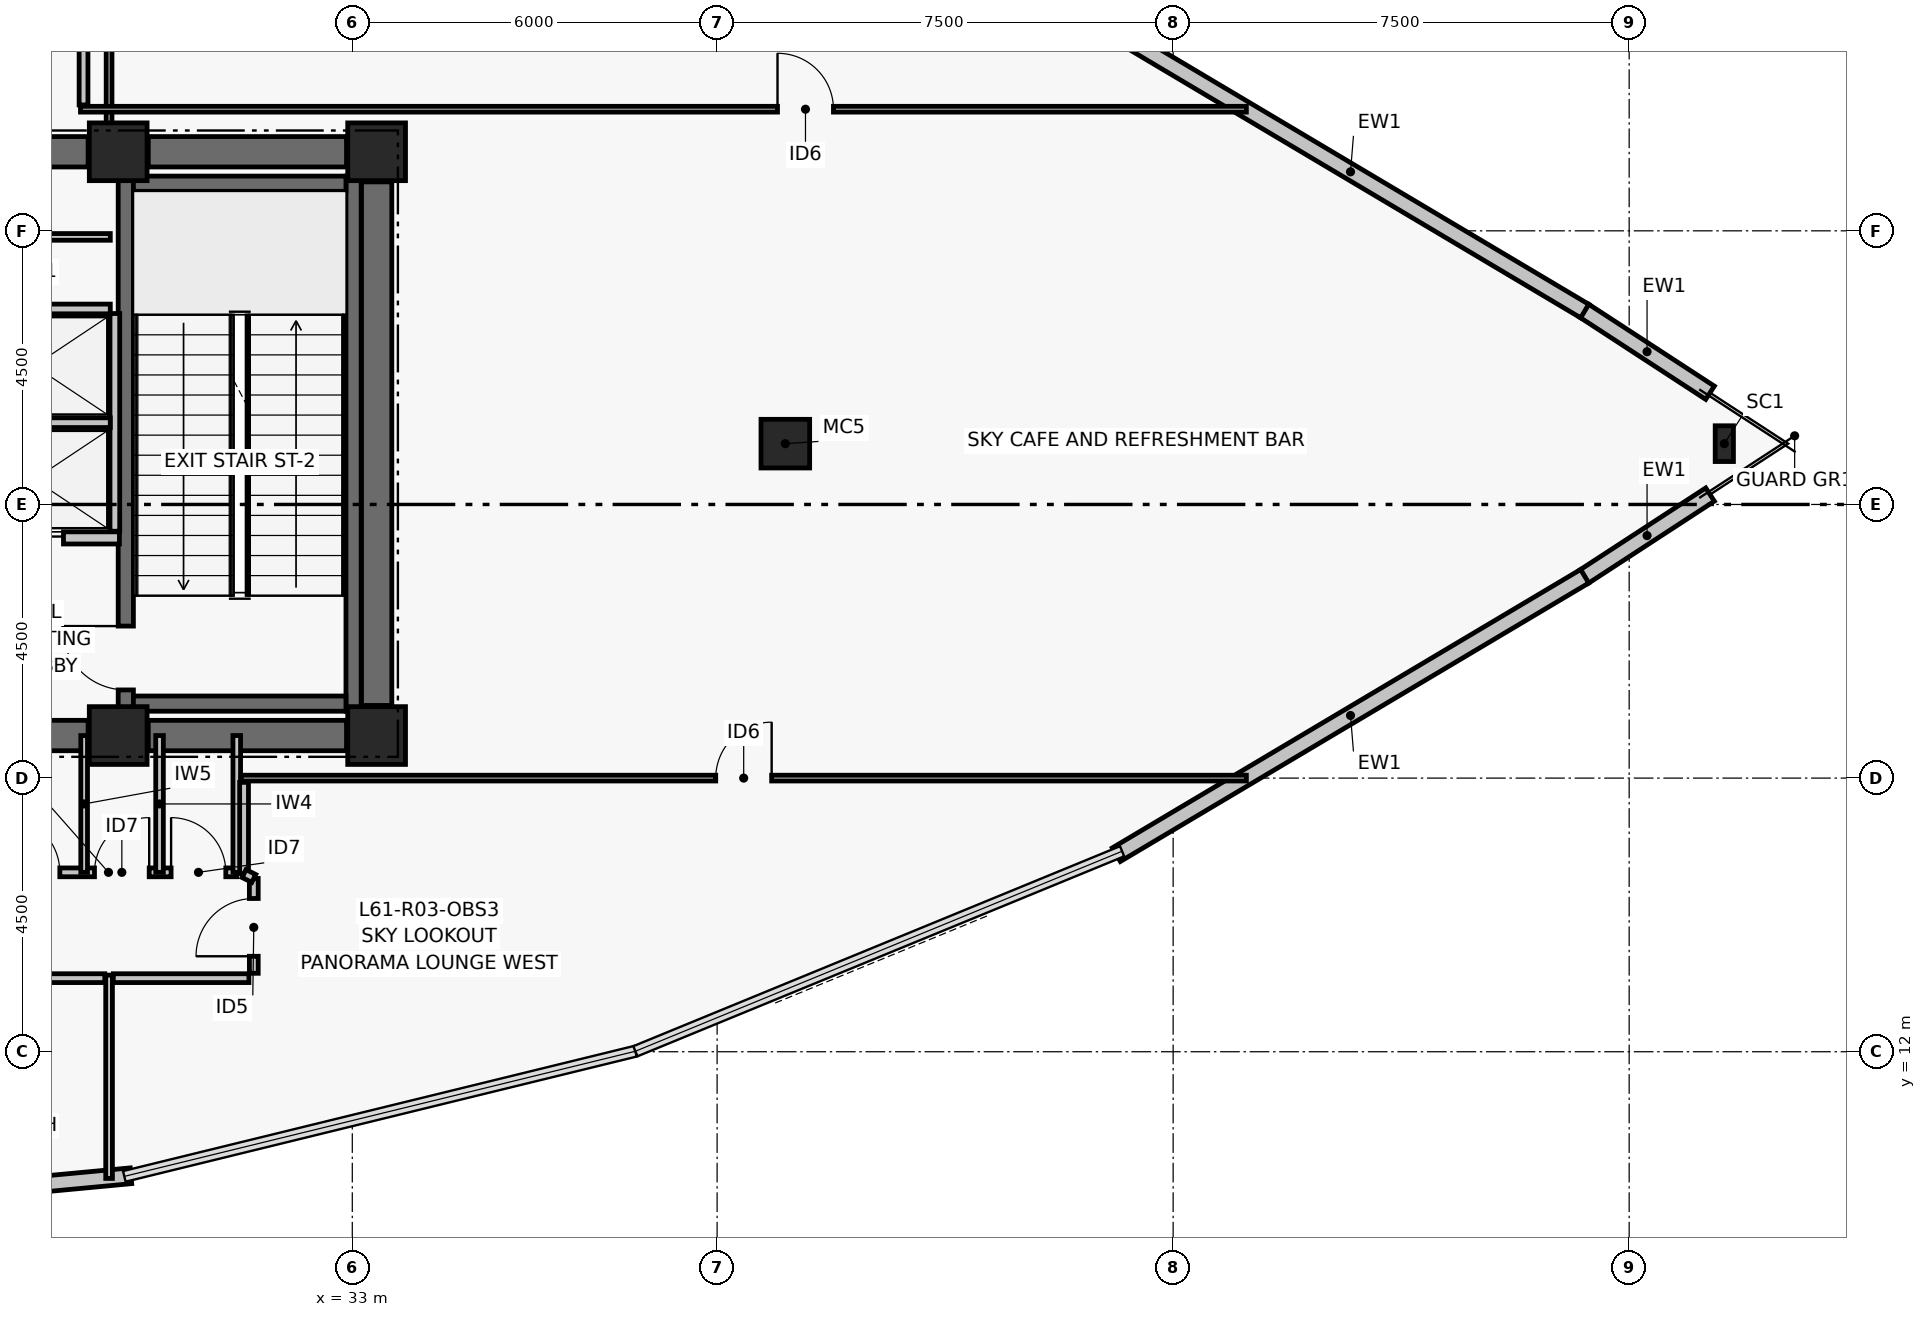
"""IFC4 building model, lengths in metres.
Left out: names, types, materials, properties, quantities, classifications, styles, units other than length and angle.
Written with IfcOpenShell. Run it as: python <this file> out.ifc"""

import sys

from ifc_helpers import new_model, si_unit, direction, frame, frame_2d, origin, origin_2d, place, context, subcontext, project, spatial, rectangle, hollow_rectangle, i_section, extrude, element, fill, save


model = new_model("IFC4")
c1 = context("Model", 3, precision=1e-05, world=origin(), true_north=direction((0.0, 1.0)))
c2 = subcontext(c1, "Body", "Model", "MODEL_VIEW")
j1 = project(units=[si_unit("LENGTHUNIT", "METRE"), si_unit("PLANEANGLEUNIT", "RADIAN")], contexts=[c1])
p1 = place(None, origin())
s1 = spatial("IfcSite", under=j1, at=p1, CompositionType="ELEMENT")
p2 = place(p1, origin())
s2 = spatial("IfcBuilding", under=s1, at=p2, CompositionType="ELEMENT")
p3 = place(p2, frame((0.0, 0.0, 242.64)))
s3 = spatial("IfcBuildingStorey", under=s2, at=p3, CompositionType="ELEMENT", Elevation=242.64)
for number, where, z_axis, x_axis in (
    (1, (29.15, 17.2, 0.0), (0.0, 0.0, 1.0), (1.0, 0.0, 0.0)),
    (2, (33.4, 17.2, 0.0), (0.0, 0.0, 1.0), (1.0, 0.0, 0.0)),
    (3, (29.15, 26.8, 0.0), (0.0, 0.0, 1.0), (1.0, 0.0, 0.0)),
    (4, (33.4, 26.8, 0.0), (0.0, 0.0, 1.0), (1.0, 0.0, 0.0)),
):
    element("IfcColumn", number, at=place(p3, frame(where, z_axis=z_axis, x_axis=x_axis)), inside=s3, PredefinedType="COLUMN", context=c2, shape_type="SweptSolid", body=[
        extrude(rectangle(XDim=0.95, YDim=0.95, at=origin_2d()), origin(), (0.0, 0.0, 1.0), 4.5),
    ])
p4 = place(p3, frame((26.85, 17.2, 0.0), z_axis=(0.0, 0.0, 1.0), x_axis=(1.0, 0.0, 0.0)))
e5 = element("IfcWall", 5, at=p4, inside=s3, PredefinedType="SHEAR", context=c2, shape_type="SweptSolid", body=[
    extrude(rectangle(XDim=1.805, YDim=0.5, at=frame_2d((0.902, 0.0))), origin(), (0.0, 0.0, 1.0), 4.28),
])
p5 = place(p3, frame((29.645, 17.2, 0.0), z_axis=(0.0, 0.0, 1.0), x_axis=(1.0, 0.0, 0.0)))
e6 = element("IfcWall", 6, at=p5, inside=s3, PredefinedType="SHEAR", context=c2, shape_type="SweptSolid", body=[
    extrude(rectangle(XDim=3.26, YDim=0.5, at=frame_2d((1.63, 0.0))), origin(), (0.0, 0.0, 1.0), 4.28),
])
p6 = place(p3, frame((26.85, 26.8, 0.0), z_axis=(0.0, 0.0, 1.0), x_axis=(1.0, 0.0, 0.0)))
e7 = element("IfcWall", 7, at=p6, inside=s3, PredefinedType="SHEAR", context=c2, shape_type="SweptSolid", body=[
    extrude(rectangle(XDim=1.805, YDim=0.5, at=frame_2d((0.902, 0.0))), origin(), (0.0, 0.0, 1.0), 4.28),
])
p7 = place(p3, frame((29.645, 26.8, 0.0), z_axis=(0.0, 0.0, 1.0), x_axis=(1.0, 0.0, 0.0)))
e8 = element("IfcWall", 8, at=p7, inside=s3, PredefinedType="SHEAR", context=c2, shape_type="SweptSolid", body=[
    extrude(rectangle(XDim=3.26, YDim=0.5, at=frame_2d((1.63, 0.0))), origin(), (0.0, 0.0, 1.0), 4.28),
])
p8 = place(p3, frame((33.4, 17.695, 0.0), z_axis=(0.0, 0.0, 1.0), x_axis=(0.0, 1.0, 0.0)))
e9 = element("IfcWall", 9, at=p8, inside=s3, PredefinedType="SHEAR", context=c2, shape_type="SweptSolid", body=[
    extrude(rectangle(XDim=8.61, YDim=0.5, at=frame_2d((4.305, 0.0))), origin(), (0.0, 0.0, 1.0), 4.28),
])
p9 = place(p3, frame((29.275, 17.6, 0.0), z_axis=(0.0, 0.0, 1.0), x_axis=(0.0, 1.0, 0.0)))
e10 = element("IfcWall", 10, at=p9, inside=s3, PredefinedType="SHEAR", context=c2, shape_type="SweptSolid", body=[
    extrude(rectangle(XDim=8.8, YDim=0.25, at=frame_2d((4.4, 0.0))), origin(), (0.0, 0.0, 1.0), 4.28),
])
p10 = place(p9, frame((0.35, 0.0, 0.0)))
e11 = element("IfcOpeningElement", 11, at=p10, cuts=e10, PredefinedType="OPENING", context=c2, shape_type="SweptSolid", body=[
    extrude(rectangle(XDim=1.05, YDim=2.08, at=frame_2d((0.525, 1.04))), frame((0.0, 0.135, 0.0), z_axis=(0.0, -1.0, 0.0), x_axis=(1.0, 0.0, 0.0)), (0.0, 0.0, 1.0), 0.27),
])
p11 = place(p3, frame((33.021, 17.6, 0.0), z_axis=(0.0, 0.0, 1.0), x_axis=(0.0, 1.0, 0.0)))
e12 = element("IfcWall", 12, at=p11, inside=s3, PredefinedType="SHEAR", context=c2, shape_type="SweptSolid", body=[
    extrude(rectangle(XDim=8.8, YDim=0.25, at=frame_2d((4.4, 0.0))), origin(), (0.0, 0.0, 1.0), 4.28),
])
for number, where, z_axis, x_axis in (
    (13, (29.4, 17.725, 0.0), (0.0, 0.0, 1.0), (1.0, 0.0, 0.0)),
    (14, (29.4, 26.275, 0.0), (0.0, 0.0, 1.0), (1.0, 0.0, 0.0)),
):
    element("IfcWall", number, at=place(p3, frame(where, z_axis=z_axis, x_axis=x_axis)), inside=s3, PredefinedType="SHEAR", context=c2, shape_type="SweptSolid", body=[
        extrude(rectangle(XDim=3.496, YDim=0.25, at=frame_2d((1.748, 0.0))), origin(), (0.0, 0.0, 1.0), 4.28),
    ])
p12 = place(p3, frame((40.122, 22.0, 0.0), z_axis=(0.0, 0.0, 1.0), x_axis=(1.0, 0.0, 0.0)))
e15 = element("IfcColumn", 15, at=p12, inside=s3, PredefinedType="COLUMN", context=c2, shape_type="SweptSolid", body=[
    extrude(hollow_rectangle(XDim=0.8, YDim=0.8, WallThickness=0.035, at=origin_2d()), origin(), (0.0, 0.0, 1.0), 4.5),
])
p13 = place(p3, frame((55.565, 22.0, 0.0), z_axis=(0.0, 0.0, 1.0), x_axis=(1.0, 0.0, 0.0)))
e16 = element("IfcColumn", 16, at=p13, inside=s3, PredefinedType="COLUMN", context=c2, shape_type="SweptSolid", body=[
    extrude(i_section(OverallWidth=0.3, OverallDepth=0.588, WebThickness=0.012, FlangeThickness=0.02, at=origin_2d()), origin(), (0.0, 0.0, 1.0), 4.5),
])
for number, where, z_axis, x_axis in (
    (17, (55.33, 21.163, 0.0), (0.0, 0.0, 1.0), (-0.838, -0.546, 0.0)),
    (18, (53.259, 24.187, 0.0), (0.0, 0.0, 1.0), (0.838, -0.546, 0.0)),
):
    element("IfcWall", number, at=place(p3, frame(where, z_axis=z_axis, x_axis=x_axis)), inside=s3, PredefinedType="PARTITIONING", context=c2, shape_type="SweptSolid", body=[
        extrude(rectangle(XDim=2.472, YDim=0.26, at=frame_2d((1.236, 0.0))), origin(), (0.0, 0.0, 1.0), 4.28),
    ])
p14 = place(p3, frame((45.566, 28.76, 0.0), z_axis=(0.0, 0.0, 1.0), x_axis=(0.859615449495, -0.510941561227, 0.0)))
e19 = element("IfcWall", 19, at=p14, inside=s3, PredefinedType="PARTITIONING", context=c2, shape_type="SweptSolid", body=[
    extrude(rectangle(XDim=8.961, YDim=0.26, at=frame_2d((4.48, 0.0))), origin(), (0.0, 0.0, 1.0), 4.28),
])
p15 = place(p3, frame((29.36, 9.96, 0.0), z_axis=(0.0, 0.0, 1.0), x_axis=(-0.995616246459, -0.093532292754, 0.0)))
e20 = element("IfcWall", 20, at=p15, inside=s3, PredefinedType="PARTITIONING", context=c2, shape_type="SweptSolid", body=[
    extrude(rectangle(XDim=8.961, YDim=0.26, at=frame_2d((4.48, 0.0))), origin(), (0.0, 0.0, 1.0), 4.28),
])
p16 = place(p3, frame((53.269, 19.819, 0.0), z_axis=(0.0, 0.0, 1.0), x_axis=(-0.859615449495, -0.510941561227, 0.0)))
e21 = element("IfcWall", 21, at=p16, inside=s3, PredefinedType="PARTITIONING", context=c2, shape_type="SweptSolid", body=[
    extrude(rectangle(XDim=8.961, YDim=0.26, at=frame_2d((4.48, 0.0))), origin(), (0.0, 0.0, 1.0), 4.28),
])
p17 = place(p3, frame((26.37, 20.45, 0.0), z_axis=(0.0, 0.0, 1.0), x_axis=(1.0, 0.0, 0.0)))
e22 = element("IfcWall", 22, at=p17, inside=s3, PredefinedType="PARTITIONING", context=c2, shape_type="SweptSolid", body=[
    extrude(rectangle(XDim=2.8, YDim=0.2, at=frame_2d((1.4, 0.0))), origin(), (0.0, 0.0, 1.0), 4.28),
])
p18 = place(p17, frame((0.78, 0.0, 0.0)))
e23 = element("IfcOpeningElement", 23, at=p18, cuts=e22, PredefinedType="OPENING", context=c2, shape_type="SweptSolid", body=[
    extrude(rectangle(XDim=1.1, YDim=2.08, at=frame_2d((0.55, 1.04))), frame((0.0, 0.11, 0.0), z_axis=(0.0, -1.0, 0.0), x_axis=(1.0, 0.0, 0.0)), (0.0, 0.0, 1.0), 0.22),
])
p19 = place(p3, frame((29.095, 20.56, 0.0), z_axis=(0.0, 0.0, 1.0), x_axis=(0.0, 1.0, 0.0)))
e24 = element("IfcWall", 24, at=p19, inside=s3, PredefinedType="PARTITIONING", context=c2, shape_type="SweptSolid", body=[
    extrude(rectangle(XDim=3.58, YDim=0.16, at=frame_2d((1.79, 0.0))), origin(), (0.0, 0.0, 1.0), 4.28),
])
p20 = place(p3, frame((26.37, 22.345, 0.0), z_axis=(0.0, 0.0, 1.0), x_axis=(1.0, 0.0, 0.0)))
e25 = element("IfcWall", 25, at=p20, inside=s3, PredefinedType="PARTITIONING", context=c2, shape_type="SweptSolid", body=[
    extrude(rectangle(XDim=2.65, YDim=0.16, at=frame_2d((1.325, 0.0))), origin(), (0.0, 0.0, 1.0), 4.28),
])
p21 = place(p3, frame((26.53, 24.215, 0.0), z_axis=(0.0, 0.0, 1.0), x_axis=(1.0, 0.0, 0.0)))
e26 = element("IfcWall", 26, at=p21, inside=s3, PredefinedType="PARTITIONING", context=c2, shape_type="SweptSolid", body=[
    extrude(rectangle(XDim=2.49, YDim=0.16, at=frame_2d((1.245, 0.0))), origin(), (0.0, 0.0, 1.0), 4.28),
])
p22 = place(p3, frame((24.26, 25.4, 0.0), z_axis=(0.0, 0.0, 1.0), x_axis=(1.0, 0.0, 0.0)))
e27 = element("IfcWall", 27, at=p22, inside=s3, PredefinedType="PARTITIONING", context=c2, shape_type="SweptSolid", body=[
    extrude(rectangle(XDim=4.76, YDim=0.11, at=frame_2d((2.38, 0.0))), origin(), (0.0, 0.0, 1.0), 4.28),
])
p23 = place(p3, frame((26.88, 14.95, 0.0), z_axis=(0.0, 0.0, 1.0), x_axis=(1.0, 0.0, 0.0)))
e28 = element("IfcWall", 28, at=p23, inside=s3, PredefinedType="PARTITIONING", context=c2, shape_type="SweptSolid", body=[
    extrude(rectangle(XDim=4.22, YDim=0.145, at=frame_2d((2.11, 0.0))), origin(), (0.0, 0.0, 1.0), 3.76),
])
p24 = place(p23, frame((0.39, 0.0, 0.0)))
e29 = element("IfcOpeningElement", 29, at=p24, cuts=e28, PredefinedType="OPENING", context=c2, shape_type="SweptSolid", body=[
    extrude(rectangle(XDim=0.92, YDim=2.05, at=frame_2d((0.46, 1.025))), frame((0.0, 0.083, 0.0), z_axis=(0.0, -1.0, 0.0), x_axis=(1.0, 0.0, 0.0)), (0.0, 0.0, 1.0), 0.165),
])
p25 = place(p23, frame((1.88, 0.0, 0.0)))
e30 = element("IfcOpeningElement", 30, at=p25, cuts=e28, PredefinedType="OPENING", context=c2, shape_type="SweptSolid", body=[
    extrude(rectangle(XDim=0.9, YDim=2.02, at=frame_2d((0.45, 1.01))), frame((0.0, 0.083, 0.0), z_axis=(0.0, -1.0, 0.0), x_axis=(1.0, 0.0, 0.0)), (0.0, 0.0, 1.0), 0.165),
])
p26 = place(p23, frame((3.14, 0.0, 0.0)))
e31 = element("IfcOpeningElement", 31, at=p26, cuts=e28, PredefinedType="OPENING", context=c2, shape_type="SweptSolid", body=[
    extrude(rectangle(XDim=0.9, YDim=2.02, at=frame_2d((0.45, 1.01))), frame((0.0, 0.083, 0.0), z_axis=(0.0, -1.0, 0.0), x_axis=(1.0, 0.0, 0.0)), (0.0, 0.0, 1.0), 0.165),
])
p27 = place(p3, frame((28.59, 14.95, 0.0), z_axis=(0.0, 0.0, 1.0), x_axis=(0.0, 1.0, 0.0)))
e32 = element("IfcWall", 32, at=p27, inside=s3, PredefinedType="PARTITIONING", context=c2, shape_type="SweptSolid", body=[
    extrude(rectangle(XDim=2.25, YDim=0.11, at=frame_2d((1.125, 0.0))), origin(), (0.0, 0.0, 1.0), 3.41),
])
for number, where, z_axis, x_axis in (
    (33, (29.83, 14.95, 0.0), (0.0, 0.0, 1.0), (0.0, 1.0, 0.0)),
    (34, (31.1, 14.95, 0.0), (0.0, 0.0, 1.0), (0.0, 1.0, 0.0)),
):
    element("IfcWall", number, at=place(p3, frame(where, z_axis=z_axis, x_axis=x_axis)), inside=s3, PredefinedType="PARTITIONING", context=c2, shape_type="SweptSolid", body=[
        extrude(rectangle(XDim=2.25, YDim=0.125, at=frame_2d((1.125, 0.0))), origin(), (0.0, 0.0, 1.0), 3.41),
    ])
p28 = place(p3, frame((17.54, 13.21, 0.0), z_axis=(0.0, 0.0, 1.0), x_axis=(1.0, 0.0, 0.0)))
e35 = element("IfcWall", 35, at=p28, inside=s3, PredefinedType="PARTITIONING", context=c2, shape_type="SweptSolid", body=[
    extrude(rectangle(XDim=11.39, YDim=0.145, at=frame_2d((5.695, 0.0))), origin(), (0.0, 0.0, 1.0), 3.56),
])
p29 = place(p28, frame((1.519, 0.0, 0.0)))
e36 = element("IfcOpeningElement", 36, at=p29, cuts=e35, PredefinedType="OPENING", context=c2, shape_type="SweptSolid", body=[
    extrude(rectangle(XDim=0.92, YDim=2.05, at=frame_2d((0.46, 1.025))), frame((0.0, 0.083, 0.0), z_axis=(0.0, -1.0, 0.0), x_axis=(1.0, 0.0, 0.0)), (0.0, 0.0, 1.0), 0.165),
])
p30 = place(p3, frame((29.07, 13.21, 0.0), z_axis=(0.0, 0.0, 1.0), x_axis=(1.0, 0.0, 0.0)))
e37 = element("IfcWall", 37, at=p30, inside=s3, PredefinedType="PARTITIONING", context=c2, shape_type="SweptSolid", body=[
    extrude(rectangle(XDim=2.23, YDim=0.145, at=frame_2d((1.115, 0.0))), origin(), (0.0, 0.0, 1.0), 4.28),
])
p31 = place(p3, frame((31.38, 13.29, 0.0), z_axis=(0.0, 0.0, 1.0), x_axis=(0.0, 1.0, 0.0)))
e38 = element("IfcWall", 38, at=p31, inside=s3, PredefinedType="PARTITIONING", context=c2, shape_type="SweptSolid", body=[
    extrude(rectangle(XDim=1.56, YDim=0.145, at=frame_2d((0.78, 0.0))), origin(), (0.0, 0.0, 1.0), 4.28),
])
p32 = place(p31, frame((0.28, 0.0, 0.0)))
e39 = element("IfcOpeningElement", 39, at=p32, cuts=e38, PredefinedType="OPENING", context=c2, shape_type="SweptSolid", body=[
    extrude(rectangle(XDim=0.95, YDim=2.06, at=frame_2d((0.475, 1.03))), frame((0.0, 0.083, 0.0), z_axis=(0.0, -1.0, 0.0), x_axis=(1.0, 0.0, 0.0)), (0.0, 0.0, 1.0), 0.165),
])
p33 = place(p3, frame((31.22, 14.93, 0.0), z_axis=(0.0, 0.0, 1.0), x_axis=(0.0, 1.0, 0.0)))
e40 = element("IfcWall", 40, at=p33, inside=s3, PredefinedType="PARTITIONING", context=c2, shape_type="SweptSolid", body=[
    extrude(rectangle(XDim=1.5, YDim=0.145, at=frame_2d((0.75, 0.0))), origin(), (0.0, 0.0, 1.0), 3.76),
])
p34 = place(p3, frame((28.58, 27.57, 0.0), z_axis=(0.0, 0.0, 1.0), x_axis=(0.0, 1.0, 0.0)))
e41 = element("IfcWall", 41, at=p34, inside=s3, PredefinedType="PARTITIONING", context=c2, shape_type="SweptSolid", body=[
    extrude(rectangle(XDim=1.13, YDim=0.145, at=frame_2d((0.565, 0.0))), origin(), (0.0, 0.0, 1.0), 4.28),
])
p35 = place(p3, frame((29.0, 9.917, 0.0), z_axis=(0.0, 0.0, 1.0), x_axis=(0.0, 1.0, 0.0)))
e42 = element("IfcWall", 42, at=p35, inside=s3, PredefinedType="PARTITIONING", context=c2, shape_type="SweptSolid", body=[
    extrude(rectangle(XDim=3.344, YDim=0.11, at=frame_2d((1.672, 0.0))), origin(), (0.0, 0.0, 1.0), 4.28),
])
p36 = place(p3, frame((29.0, 27.17, 0.0), z_axis=(0.0, 0.0, 1.0), x_axis=(0.0, 1.0, 0.0)))
e43 = element("IfcWall", 43, at=p36, inside=s3, PredefinedType="PARTITIONING", context=c2, shape_type="SweptSolid", body=[
    extrude(rectangle(XDim=6.914, YDim=0.095, at=frame_2d((3.457, 0.0))), origin(), (0.0, 0.0, 1.0), 3.41),
])
p37 = place(p3, frame((31.17, 16.5, 0.0), z_axis=(0.0, 0.0, 1.0), x_axis=(1.0, 0.0, 0.0)))
e44 = element("IfcWall", 44, at=p37, inside=s3, PredefinedType="PARTITIONING", context=c2, shape_type="SweptSolid", body=[
    extrude(rectangle(XDim=16.534, YDim=0.095, at=frame_2d((8.267, 0.0))), origin(), (0.0, 0.0, 1.0), 3.76),
])
p38 = place(p37, frame((7.807, 0.0, 0.0)))
e45 = element("IfcOpeningElement", 45, at=p38, cuts=e44, PredefinedType="OPENING", context=c2, shape_type="SweptSolid", body=[
    extrude(rectangle(XDim=0.92, YDim=2.05, at=frame_2d((0.46, 1.025))), frame((0.0, 0.057, 0.0), z_axis=(0.0, -1.0, 0.0), x_axis=(1.0, 0.0, 0.0)), (0.0, 0.0, 1.0), 0.115),
])
p39 = place(p3, frame((28.53, 27.5, 0.0), z_axis=(0.0, 0.0, 1.0), x_axis=(1.0, 0.0, 0.0)))
e46 = element("IfcWall", 46, at=p39, inside=s3, PredefinedType="PARTITIONING", context=c2, shape_type="SweptSolid", body=[
    extrude(rectangle(XDim=19.174, YDim=0.095, at=frame_2d((9.587, 0.0))), origin(), (0.0, 0.0, 1.0), 3.76),
])
p40 = place(p39, frame((11.463, 0.0, 0.0)))
e47 = element("IfcOpeningElement", 47, at=p40, cuts=e46, PredefinedType="OPENING", context=c2, shape_type="SweptSolid", body=[
    extrude(rectangle(XDim=0.92, YDim=2.05, at=frame_2d((0.46, 1.025))), frame((0.0, 0.057, 0.0), z_axis=(0.0, -1.0, 0.0), x_axis=(1.0, 0.0, 0.0)), (0.0, 0.0, 1.0), 0.115),
])
p41 = place(p3, frame((31.38, 14.85, 0.0), z_axis=(0.0, 0.0, 1.0), x_axis=(-0.89470021502, 0.446667130247, 0.0)))
e48 = element("IfcWall", 48, at=p41, inside=s3, PredefinedType="PARTITIONING", context=c2, shape_type="SweptSolid", body=[
    extrude(rectangle(XDim=0.179, YDim=0.145, at=frame_2d((0.089, 0.0))), origin(), (0.0, 0.0, 1.0), 4.28),
])
p42 = place(p10, origin())
e49 = element("IfcDoor", 49, at=p42, inside=s3, OperationType="SINGLE_SWING_RIGHT", PredefinedType="DOOR", context=c2, shape_type="SweptSolid", body=[
    extrude(rectangle(XDim=1.05, YDim=2.08, at=frame_2d((0.525, 1.04))), frame((0.0, 0.025, 0.0), z_axis=(0.0, -1.0, 0.0), x_axis=(1.0, 0.0, 0.0)), (0.0, 0.0, 1.0), 0.05),
])
fill(e11, e49)
p43 = place(p18, origin())
e50 = element("IfcDoor", 50, at=p43, inside=s3, OperationType="DOUBLE_DOOR_SLIDING", PredefinedType="DOOR", context=c2, shape_type="SweptSolid", body=[
    extrude(rectangle(XDim=1.1, YDim=2.08, at=frame_2d((0.55, 1.04))), frame((0.0, 0.025, 0.0), z_axis=(0.0, -1.0, 0.0), x_axis=(1.0, 0.0, 0.0)), (0.0, 0.0, 1.0), 0.05),
])
fill(e23, e50)
p44 = place(p24, origin())
e51 = element("IfcDoor", 51, at=p44, inside=s3, OperationType="SINGLE_SWING_LEFT", PredefinedType="DOOR", context=c2, shape_type="SweptSolid", body=[
    extrude(rectangle(XDim=0.92, YDim=2.05, at=frame_2d((0.46, 1.025))), frame((0.0, 0.025, 0.0), z_axis=(0.0, -1.0, 0.0), x_axis=(1.0, 0.0, 0.0)), (0.0, 0.0, 1.0), 0.05),
])
fill(e29, e51)
p45 = place(p25, origin())
e52 = element("IfcDoor", 52, at=p45, inside=s3, OperationType="SINGLE_SWING_RIGHT", PredefinedType="DOOR", context=c2, shape_type="SweptSolid", body=[
    extrude(rectangle(XDim=0.9, YDim=2.02, at=frame_2d((0.45, 1.01))), frame((0.0, 0.025, 0.0), z_axis=(0.0, -1.0, 0.0), x_axis=(1.0, 0.0, 0.0)), (0.0, 0.0, 1.0), 0.05),
])
fill(e30, e52)
p46 = place(p26, origin())
e53 = element("IfcDoor", 53, at=p46, inside=s3, OperationType="SINGLE_SWING_LEFT", PredefinedType="DOOR", context=c2, shape_type="SweptSolid", body=[
    extrude(rectangle(XDim=0.9, YDim=2.02, at=frame_2d((0.45, 1.01))), frame((0.0, 0.025, 0.0), z_axis=(0.0, -1.0, 0.0), x_axis=(1.0, 0.0, 0.0)), (0.0, 0.0, 1.0), 0.05),
])
fill(e31, e53)
p47 = place(p32, origin())
e54 = element("IfcDoor", 54, at=p47, inside=s3, OperationType="SINGLE_SWING_LEFT", PredefinedType="DOOR", context=c2, shape_type="SweptSolid", body=[
    extrude(rectangle(XDim=0.95, YDim=2.06, at=frame_2d((0.475, 1.03))), frame((0.0, 0.025, 0.0), z_axis=(0.0, -1.0, 0.0), x_axis=(1.0, 0.0, 0.0)), (0.0, 0.0, 1.0), 0.05),
])
fill(e39, e54)
p48 = place(p38, origin())
e55 = element("IfcDoor", 55, at=p48, inside=s3, OperationType="SINGLE_SWING_RIGHT", PredefinedType="DOOR", context=c2, shape_type="SweptSolid", body=[
    extrude(rectangle(XDim=0.92, YDim=2.05, at=frame_2d((0.46, 1.025))), frame((0.0, 0.025, 0.0), z_axis=(0.0, -1.0, 0.0), x_axis=(1.0, 0.0, 0.0)), (0.0, 0.0, 1.0), 0.05),
])
fill(e45, e55)
p49 = place(p40, origin())
e56 = element("IfcDoor", 56, at=p49, inside=s3, OperationType="SINGLE_SWING_LEFT", PredefinedType="DOOR", context=c2, shape_type="SweptSolid", body=[
    extrude(rectangle(XDim=0.92, YDim=2.05, at=frame_2d((0.46, 1.025))), frame((0.0, 0.025, 0.0), z_axis=(0.0, -1.0, 0.0), x_axis=(1.0, 0.0, 0.0)), (0.0, 0.0, 1.0), 0.05),
])
fill(e47, e56)
save(model, sys.argv[1])
